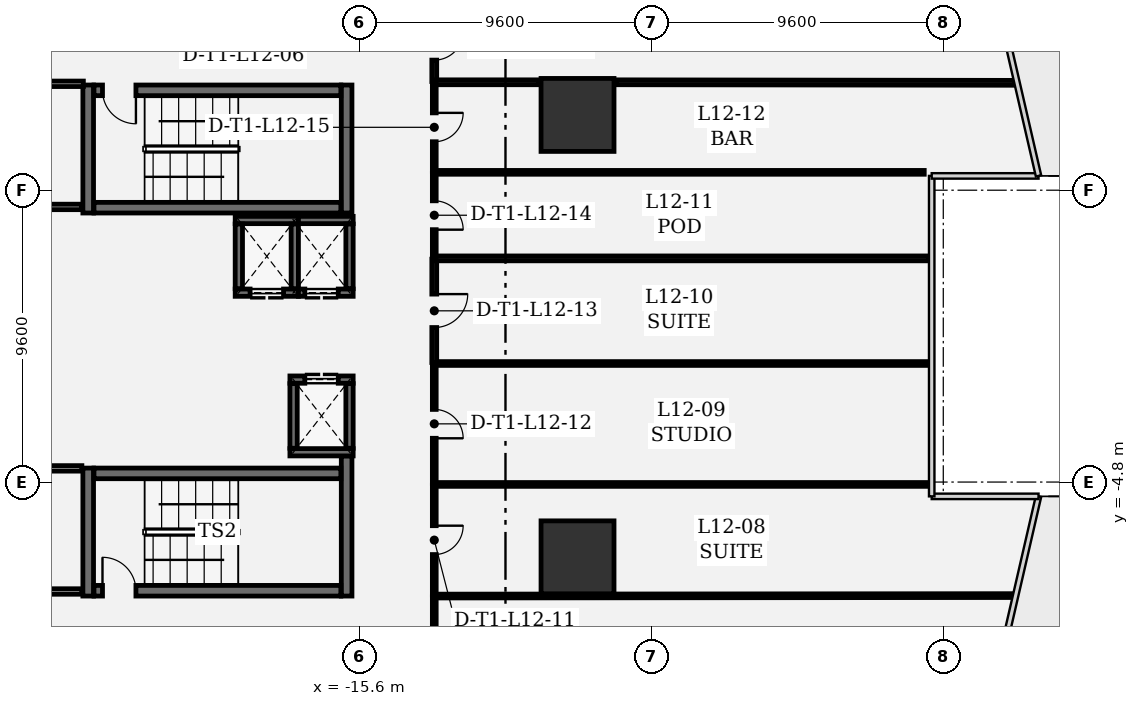
"""IFC4 building model, lengths in metres.
Left out: names, types, materials, properties, quantities, classifications, styles, units other than length and angle.
Written with IfcOpenShell. Run it as: python <this file> out.ifc"""

import sys

from ifc_helpers import new_model, si_unit, direction, frame, frame_2d, origin, origin_2d, place, context, subcontext, project, spatial, rectangle, extrude, element, fill, save


model = new_model("IFC4")
c1 = context("Model", 3, precision=1e-05, world=origin(), true_north=direction((0.0, 1.0)))
c2 = subcontext(c1, "Body", "Model", "MODEL_VIEW")
j1 = project(units=[si_unit("LENGTHUNIT", "METRE"), si_unit("PLANEANGLEUNIT", "RADIAN")], contexts=[c1])
p1 = place(None, origin())
s1 = spatial("IfcSite", under=j1, at=p1, CompositionType="ELEMENT")
p2 = place(p1, origin())
s2 = spatial("IfcBuilding", under=s1, at=p2, CompositionType="ELEMENT")
p3 = place(p2, frame((0.0, 0.0, 57.6)))
s3 = spatial("IfcBuildingStorey", under=s2, at=p3, CompositionType="ELEMENT", Elevation=57.6)
for number, where, z_axis, x_axis in (
    (1, (-8.43, -7.276, 0.0), (0.0, 0.0, 1.0), (1.0, 0.0, 0.0)),
    (2, (-8.43, 7.276, 0.0), (0.0, 0.0, 1.0), (1.0, 0.0, 0.0)),
):
    element("IfcColumn", number, at=place(p3, frame(where, z_axis=z_axis, x_axis=x_axis)), inside=s3, PredefinedType="COLUMN", context=c2, shape_type="SweptSolid", body=[
        extrude(rectangle(XDim=2.4, YDim=2.4, at=origin_2d()), origin(), (0.0, 0.0, 1.0), 4.2),
    ])
for number, where, z_axis, x_axis in (
    (3, (-24.525, 8.26, 0.0), (0.0, 0.0, 1.0), (0.0, -1.0, 0.0)),
    (4, (-16.025, 4.05, 0.0), (0.0, 0.0, 1.0), (0.0, 1.0, 0.0)),
):
    element("IfcWall", number, at=place(p3, frame(where, z_axis=z_axis, x_axis=x_axis)), inside=s3, PredefinedType="SHEAR", context=c2, shape_type="SweptSolid", body=[
        extrude(rectangle(XDim=4.21, YDim=0.35, at=frame_2d((2.105, 0.0))), origin(), (0.0, 0.0, 1.0), 3.92),
    ])
p4 = place(p3, frame((-24.335, 4.225, 0.0), z_axis=(0.0, 0.0, 1.0), x_axis=(1.0, 0.0, 0.0)))
e5 = element("IfcWall", 5, at=p4, inside=s3, PredefinedType="SHEAR", context=c2, shape_type="SweptSolid", body=[
    extrude(rectangle(XDim=8.12, YDim=0.35, at=frame_2d((4.06, 0.0))), origin(), (0.0, 0.0, 1.0), 3.92),
])
p5 = place(p3, frame((-16.215, 8.085, 0.0), z_axis=(0.0, 0.0, 1.0), x_axis=(-1.0, 0.0, 0.0)))
e6 = element("IfcWall", 6, at=p5, inside=s3, PredefinedType="SHEAR", context=c2, shape_type="SweptSolid", body=[
    extrude(rectangle(XDim=8.12, YDim=0.35, at=frame_2d((4.06, 0.0))), origin(), (0.0, 0.0, 1.0), 3.92),
])
p6 = place(p5, frame((6.74, 0.0, 0.0)))
e7 = element("IfcOpeningElement", 7, at=p6, cuts=e6, PredefinedType="OPENING", context=c2, shape_type="SweptSolid", body=[
    extrude(rectangle(XDim=1.1, YDim=2.2, at=frame_2d((0.55, 1.1))), frame((0.0, 0.185, 0.0), z_axis=(0.0, -1.0, 0.0), x_axis=(1.0, 0.0, 0.0)), (0.0, 0.0, 1.0), 0.37),
])
p7 = place(p3, frame((-24.525, -4.34, 0.0), z_axis=(0.0, 0.0, 1.0), x_axis=(0.0, -1.0, 0.0)))
e8 = element("IfcWall", 8, at=p7, inside=s3, PredefinedType="SHEAR", context=c2, shape_type="SweptSolid", body=[
    extrude(rectangle(XDim=4.21, YDim=0.35, at=frame_2d((2.105, 0.0))), origin(), (0.0, 0.0, 1.0), 3.92),
])
p8 = place(p3, frame((-16.025, -8.55, 0.0), z_axis=(0.0, 0.0, 1.0), x_axis=(0.0, 1.0, 0.0)))
e9 = element("IfcWall", 9, at=p8, inside=s3, PredefinedType="SHEAR", context=c2, shape_type="SweptSolid", body=[
    extrude(rectangle(XDim=4.61, YDim=0.35, at=frame_2d((2.305, 0.0))), origin(), (0.0, 0.0, 1.0), 3.92),
])
p9 = place(p3, frame((-24.335, -8.375, 0.0), z_axis=(0.0, 0.0, 1.0), x_axis=(1.0, 0.0, 0.0)))
e10 = element("IfcWall", 10, at=p9, inside=s3, PredefinedType="SHEAR", context=c2, shape_type="SweptSolid", body=[
    extrude(rectangle(XDim=8.12, YDim=0.35, at=frame_2d((4.06, 0.0))), origin(), (0.0, 0.0, 1.0), 3.92),
])
p10 = place(p9, frame((0.28, 0.0, 0.0)))
e11 = element("IfcOpeningElement", 11, at=p10, cuts=e10, PredefinedType="OPENING", context=c2, shape_type="SweptSolid", body=[
    extrude(rectangle(XDim=1.1, YDim=2.2, at=frame_2d((0.55, 1.1))), frame((0.0, 0.185, 0.0), z_axis=(0.0, -1.0, 0.0), x_axis=(1.0, 0.0, 0.0)), (0.0, 0.0, 1.0), 0.37),
])
p11 = place(p3, frame((-16.215, -4.515, 0.0), z_axis=(0.0, 0.0, 1.0), x_axis=(-1.0, 0.0, 0.0)))
e12 = element("IfcWall", 12, at=p11, inside=s3, PredefinedType="SHEAR", context=c2, shape_type="SweptSolid", body=[
    extrude(rectangle(XDim=8.12, YDim=0.35, at=frame_2d((4.06, 0.0))), origin(), (0.0, 0.0, 1.0), 3.92),
])
p12 = place(p3, frame((-17.61, 1.43, 0.0), z_axis=(0.0, 0.0, 1.0), x_axis=(-1.0, 0.0, 0.0)))
e13 = element("IfcWall", 13, at=p12, inside=s3, PredefinedType="SHEAR", context=c2, shape_type="SweptSolid", body=[
    extrude(rectangle(XDim=2.08, YDim=0.24, at=frame_2d((1.04, 0.0))), origin(), (0.0, 0.0, 1.0), 3.92),
])
p13 = place(p12, frame((0.49, 0.0, 0.0)))
e14 = element("IfcOpeningElement", 14, at=p13, cuts=e13, PredefinedType="OPENING", context=c2, shape_type="SweptSolid", body=[
    extrude(rectangle(XDim=1.1, YDim=2.2, at=frame_2d((0.55, 1.1))), frame((0.0, 0.13, 0.0), z_axis=(0.0, -1.0, 0.0), x_axis=(1.0, 0.0, 0.0)), (0.0, 0.0, 1.0), 0.26),
])
p14 = place(p3, frame((-19.69, 3.82, 0.0), z_axis=(0.0, 0.0, 1.0), x_axis=(1.0, 0.0, 0.0)))
e15 = element("IfcWall", 15, at=p14, inside=s3, PredefinedType="SHEAR", context=c2, shape_type="SweptSolid", body=[
    extrude(rectangle(XDim=2.08, YDim=0.24, at=frame_2d((1.04, 0.0))), origin(), (0.0, 0.0, 1.0), 3.92),
])
for number, where, z_axis, x_axis in (
    (16, (-19.57, 1.562, 0.0), (0.0, 0.0, 1.0), (0.0, 1.0, 0.0)),
    (17, (-17.73, 3.688, 0.0), (0.0, 0.0, 1.0), (0.0, -1.0, 0.0)),
):
    element("IfcWall", number, at=place(p3, frame(where, z_axis=z_axis, x_axis=x_axis)), inside=s3, PredefinedType="SHEAR", context=c2, shape_type="SweptSolid", body=[
        extrude(rectangle(XDim=2.126, YDim=0.24, at=frame_2d((1.063, 0.0))), origin(), (0.0, 0.0, 1.0), 3.92),
    ])
p15 = place(p3, frame((-15.81, 1.43, 0.0), z_axis=(0.0, 0.0, 1.0), x_axis=(-1.0, 0.0, 0.0)))
e18 = element("IfcWall", 18, at=p15, inside=s3, PredefinedType="SHEAR", context=c2, shape_type="SweptSolid", body=[
    extrude(rectangle(XDim=1.8, YDim=0.24, at=frame_2d((0.9, 0.0))), origin(), (0.0, 0.0, 1.0), 3.92),
])
p16 = place(p15, frame((0.49, 0.0, 0.0)))
e19 = element("IfcOpeningElement", 19, at=p16, cuts=e18, PredefinedType="OPENING", context=c2, shape_type="SweptSolid", body=[
    extrude(rectangle(XDim=1.1, YDim=2.2, at=frame_2d((0.55, 1.1))), frame((0.0, 0.13, 0.0), z_axis=(0.0, -1.0, 0.0), x_axis=(1.0, 0.0, 0.0)), (0.0, 0.0, 1.0), 0.26),
])
p17 = place(p3, frame((-17.61, 3.82, 0.0), z_axis=(0.0, 0.0, 1.0), x_axis=(1.0, 0.0, 0.0)))
e20 = element("IfcWall", 20, at=p17, inside=s3, PredefinedType="SHEAR", context=c2, shape_type="SweptSolid", body=[
    extrude(rectangle(XDim=1.8, YDim=0.24, at=frame_2d((0.9, 0.0))), origin(), (0.0, 0.0, 1.0), 3.92),
])
p18 = place(p3, frame((-15.93, 3.688, 0.0), z_axis=(0.0, 0.0, 1.0), x_axis=(0.0, -1.0, 0.0)))
e21 = element("IfcWall", 21, at=p18, inside=s3, PredefinedType="SHEAR", context=c2, shape_type="SweptSolid", body=[
    extrude(rectangle(XDim=2.126, YDim=0.24, at=frame_2d((1.063, 0.0))), origin(), (0.0, 0.0, 1.0), 3.92),
])
p19 = place(p3, frame((-15.81, -3.82, 0.0), z_axis=(0.0, 0.0, 1.0), x_axis=(-1.0, 0.0, 0.0)))
e22 = element("IfcWall", 22, at=p19, inside=s3, PredefinedType="SHEAR", context=c2, shape_type="SweptSolid", body=[
    extrude(rectangle(XDim=2.08, YDim=0.24, at=frame_2d((1.04, 0.0))), origin(), (0.0, 0.0, 1.0), 3.92),
])
p20 = place(p3, frame((-17.89, -1.43, 0.0), z_axis=(0.0, 0.0, 1.0), x_axis=(1.0, 0.0, 0.0)))
e23 = element("IfcWall", 23, at=p20, inside=s3, PredefinedType="SHEAR", context=c2, shape_type="SweptSolid", body=[
    extrude(rectangle(XDim=2.08, YDim=0.24, at=frame_2d((1.04, 0.0))), origin(), (0.0, 0.0, 1.0), 3.92),
])
p21 = place(p20, frame((0.49, 0.0, 0.0)))
e24 = element("IfcOpeningElement", 24, at=p21, cuts=e23, PredefinedType="OPENING", context=c2, shape_type="SweptSolid", body=[
    extrude(rectangle(XDim=1.1, YDim=2.2, at=frame_2d((0.55, 1.1))), frame((0.0, 0.13, 0.0), z_axis=(0.0, -1.0, 0.0), x_axis=(1.0, 0.0, 0.0)), (0.0, 0.0, 1.0), 0.26),
])
for number, where, z_axis, x_axis in (
    (25, (-17.77, -3.688, 0.0), (0.0, 0.0, 1.0), (0.0, 1.0, 0.0)),
    (26, (-15.93, -1.562, 0.0), (0.0, 0.0, 1.0), (0.0, -1.0, 0.0)),
):
    element("IfcWall", number, at=place(p3, frame(where, z_axis=z_axis, x_axis=x_axis)), inside=s3, PredefinedType="SHEAR", context=c2, shape_type="SweptSolid", body=[
        extrude(rectangle(XDim=2.126, YDim=0.24, at=frame_2d((1.063, 0.0))), origin(), (0.0, 0.0, 1.0), 3.92),
    ])
p22 = place(p3, frame((-28.355, 4.25, 0.0), z_axis=(0.0, 0.0, 1.0), x_axis=(1.0, 0.0, 0.0)))
e27 = element("IfcWall", 27, at=p22, inside=s3, PredefinedType="PARTITIONING", context=c2, shape_type="SweptSolid", body=[
    extrude(rectangle(XDim=3.622, YDim=0.18, at=frame_2d((1.811, 0.0))), origin(), (0.0, 0.0, 1.0), 3.92),
])
p23 = place(p3, frame((-24.684, 8.3, 0.0), z_axis=(0.0, 0.0, 1.0), x_axis=(-1.0, 0.0, 0.0)))
e28 = element("IfcWall", 28, at=p23, inside=s3, PredefinedType="PARTITIONING", context=c2, shape_type="SweptSolid", body=[
    extrude(rectangle(XDim=3.671, YDim=0.18, at=frame_2d((1.835, 0.0))), origin(), (0.0, 0.0, 1.0), 3.92),
])
p24 = place(p23, frame((1.335, 0.0, 0.0)))
e29 = element("IfcOpeningElement", 29, at=p24, cuts=e28, PredefinedType="OPENING", context=c2, shape_type="SweptSolid", body=[
    extrude(rectangle(XDim=1.0, YDim=2.15, at=frame_2d((0.5, 1.075))), frame((0.0, 0.1, 0.0), z_axis=(0.0, -1.0, 0.0), x_axis=(1.0, 0.0, 0.0)), (0.0, 0.0, 1.0), 0.2),
])
p25 = place(p3, frame((-28.355, -8.4, 0.0), z_axis=(0.0, 0.0, 1.0), x_axis=(1.0, 0.0, 0.0)))
e30 = element("IfcWall", 30, at=p25, inside=s3, PredefinedType="PARTITIONING", context=c2, shape_type="SweptSolid", body=[
    extrude(rectangle(XDim=3.622, YDim=0.18, at=frame_2d((1.811, 0.0))), origin(), (0.0, 0.0, 1.0), 3.92),
])
p26 = place(p25, frame((1.311, 0.0, 0.0)))
e31 = element("IfcOpeningElement", 31, at=p26, cuts=e30, PredefinedType="OPENING", context=c2, shape_type="SweptSolid", body=[
    extrude(rectangle(XDim=1.0, YDim=2.15, at=frame_2d((0.5, 1.075))), frame((0.0, 0.1, 0.0), z_axis=(0.0, -1.0, 0.0), x_axis=(1.0, 0.0, 0.0)), (0.0, 0.0, 1.0), 0.2),
])
p27 = place(p3, frame((-24.733, -4.35, 0.0), z_axis=(0.0, 0.0, 1.0), x_axis=(-1.0, 0.0, 0.0)))
e32 = element("IfcWall", 32, at=p27, inside=s3, PredefinedType="PARTITIONING", context=c2, shape_type="SweptSolid", body=[
    extrude(rectangle(XDim=3.622, YDim=0.18, at=frame_2d((1.811, 0.0))), origin(), (0.0, 0.0, 1.0), 3.92),
])
p28 = place(p3, frame((-13.142, 10.733, 0.0), z_axis=(0.0, 0.0, 1.0), x_axis=(0.0, -1.0, 0.0)))
e33 = element("IfcWall", 33, at=p28, inside=s3, PredefinedType="PARTITIONING", context=c2, shape_type="SweptSolid", body=[
    extrude(rectangle(XDim=2.358, YDim=0.16, at=frame_2d((1.179, 0.0))), origin(), (0.0, 0.0, 1.0), 3.92),
])
p29 = place(p28, frame((0.704, 0.0, 0.0)))
e34 = element("IfcOpeningElement", 34, at=p29, cuts=e33, PredefinedType="OPENING", context=c2, shape_type="SweptSolid", body=[
    extrude(rectangle(XDim=0.95, YDim=2.15, at=frame_2d((0.475, 1.075))), frame((0.0, 0.09, 0.0), z_axis=(0.0, -1.0, 0.0), x_axis=(1.0, 0.0, 0.0)), (0.0, 0.0, 1.0), 0.18),
])
p30 = place(p3, frame((-13.117, 8.35, 0.0), z_axis=(0.0, 0.0, 1.0), x_axis=(1.0, 0.0, 0.0)))
e35 = element("IfcWall", 35, at=p30, inside=s3, PredefinedType="PARTITIONING", context=c2, shape_type="SweptSolid", body=[
    extrude(rectangle(XDim=3.422, YDim=0.16, at=frame_2d((1.711, 0.0))), origin(), (0.0, 0.0, 1.0), 2.957),
])
p31 = place(p3, frame((-7.165, 8.35, 0.0), z_axis=(0.0, 0.0, 1.0), x_axis=(0.999999076287, -0.001359200353, 0.0)))
e36 = element("IfcWall", 36, at=p31, inside=s3, PredefinedType="PARTITIONING", context=c2, shape_type="SweptSolid", body=[
    extrude(rectangle(XDim=13.112, YDim=0.16, at=frame_2d((6.556, 0.0))), origin(), (0.0, 0.0, 1.0), 3.92),
])
p32 = place(p3, frame((5.9, -8.534, 0.0), z_axis=(0.0, 0.0, 1.0), x_axis=(-0.99999966248, -0.000821608021, 0.0)))
e37 = element("IfcWall", 37, at=p32, inside=s3, PredefinedType="PARTITIONING", context=c2, shape_type="SweptSolid", body=[
    extrude(rectangle(XDim=19.018, YDim=0.125, at=frame_2d((9.509, 0.0))), origin(), (0.0, 0.0, 1.0), 2.957),
])
p33 = place(p3, frame((-13.142, -8.575, 0.0), z_axis=(0.0, 0.0, 1.0), x_axis=(0.0, -1.0, 0.0)))
e38 = element("IfcWall", 38, at=p33, inside=s3, PredefinedType="PARTITIONING", context=c2, shape_type="SweptSolid", body=[
    extrude(rectangle(XDim=2.358, YDim=0.125, at=frame_2d((1.179, 0.0))), origin(), (0.0, 0.0, 1.0), 3.92),
])
p34 = place(p3, frame((3.139, -4.878, 0.0), z_axis=(0.0, 0.0, 1.0), x_axis=(-1.0, 0.0, 0.0)))
e39 = element("IfcWall", 39, at=p34, inside=s3, PredefinedType="PARTITIONING", context=c2, shape_type="SweptSolid", body=[
    extrude(rectangle(XDim=16.257, YDim=0.125, at=frame_2d((8.128, 0.0))), origin(), (0.0, 0.0, 1.0), 3.92),
])
p35 = place(p3, frame((-13.142, -4.903, 0.0), z_axis=(0.0, 0.0, 1.0), x_axis=(0.0, -1.0, 0.0)))
e40 = element("IfcWall", 40, at=p35, inside=s3, PredefinedType="PARTITIONING", context=c2, shape_type="SweptSolid", body=[
    extrude(rectangle(XDim=3.614, YDim=0.125, at=frame_2d((1.807, 0.0))), origin(), (0.0, 0.0, 1.0), 3.92),
])
p36 = place(p35, frame((1.332, 0.0, 0.0)))
e41 = element("IfcOpeningElement", 41, at=p36, cuts=e40, PredefinedType="OPENING", context=c2, shape_type="SweptSolid", body=[
    extrude(rectangle(XDim=0.95, YDim=2.15, at=frame_2d((0.475, 1.075))), frame((0.0, 0.073, 0.0), z_axis=(0.0, -1.0, 0.0), x_axis=(1.0, 0.0, 0.0)), (0.0, 0.0, 1.0), 0.145),
])
p37 = place(p3, frame((-13.142, -0.925, 0.0), z_axis=(0.0, 0.0, 1.0), x_axis=(0.0, -1.0, 0.0)))
e42 = element("IfcWall", 42, at=p37, inside=s3, PredefinedType="PARTITIONING", context=c2, shape_type="SweptSolid", body=[
    extrude(rectangle(XDim=3.92, YDim=0.125, at=frame_2d((1.96, 0.0))), origin(), (0.0, 0.0, 1.0), 3.92),
])
p38 = place(p37, frame((1.485, 0.0, 0.0)))
e43 = element("IfcOpeningElement", 43, at=p38, cuts=e42, PredefinedType="OPENING", context=c2, shape_type="SweptSolid", body=[
    extrude(rectangle(XDim=0.95, YDim=2.15, at=frame_2d((0.475, 1.075))), frame((0.0, 0.073, 0.0), z_axis=(0.0, -1.0, 0.0), x_axis=(1.0, 0.0, 0.0)), (0.0, 0.0, 1.0), 0.145),
])
p39 = place(p3, frame((3.139, -0.9, 0.0), z_axis=(0.0, 0.0, 1.0), x_axis=(-1.0, 0.0, 0.0)))
e44 = element("IfcWall", 44, at=p39, inside=s3, PredefinedType="PARTITIONING", context=c2, shape_type="SweptSolid", body=[
    extrude(rectangle(XDim=16.257, YDim=0.125, at=frame_2d((8.128, 0.0))), origin(), (0.0, 0.0, 1.0), 3.92),
])
p40 = place(p3, frame((-13.142, 2.532, 0.0), z_axis=(0.0, 0.0, 1.0), x_axis=(0.0, -1.0, 0.0)))
e45 = element("IfcWall", 45, at=p40, inside=s3, PredefinedType="PARTITIONING", context=c2, shape_type="SweptSolid", body=[
    extrude(rectangle(XDim=3.4, YDim=0.16, at=frame_2d((1.7, 0.0))), origin(), (0.0, 0.0, 1.0), 3.92),
])
p41 = place(p40, frame((1.15, 0.0, 0.0)))
e46 = element("IfcOpeningElement", 46, at=p41, cuts=e45, PredefinedType="OPENING", context=c2, shape_type="SweptSolid", body=[
    extrude(rectangle(XDim=1.1, YDim=2.15, at=frame_2d((0.55, 1.075))), frame((0.0, 0.09, 0.0), z_axis=(0.0, -1.0, 0.0), x_axis=(1.0, 0.0, 0.0)), (0.0, 0.0, 1.0), 0.18),
])
p42 = place(p3, frame((3.139, 2.557, 0.0), z_axis=(0.0, 0.0, 1.0), x_axis=(-1.0, 0.0, 0.0)))
e47 = element("IfcWall", 47, at=p42, inside=s3, PredefinedType="PARTITIONING", context=c2, shape_type="SweptSolid", body=[
    extrude(rectangle(XDim=16.257, YDim=0.16, at=frame_2d((8.128, 0.0))), origin(), (0.0, 0.0, 1.0), 3.92),
])
p43 = place(p3, frame((-13.142, 5.363, 0.0), z_axis=(0.0, 0.0, 1.0), x_axis=(0.0, -1.0, 0.0)))
e48 = element("IfcWall", 48, at=p43, inside=s3, PredefinedType="PARTITIONING", context=c2, shape_type="SweptSolid", body=[
    extrude(rectangle(XDim=2.772, YDim=0.125, at=frame_2d((1.386, 0.0))), origin(), (0.0, 0.0, 1.0), 3.92),
])
p44 = place(p43, frame((0.911, 0.0, 0.0)))
e49 = element("IfcOpeningElement", 49, at=p44, cuts=e48, PredefinedType="OPENING", context=c2, shape_type="SweptSolid", body=[
    extrude(rectangle(XDim=0.95, YDim=2.15, at=frame_2d((0.475, 1.075))), frame((0.0, 0.073, 0.0), z_axis=(0.0, -1.0, 0.0), x_axis=(1.0, 0.0, 0.0)), (0.0, 0.0, 1.0), 0.145),
])
p45 = place(p3, frame((2.973, 5.388, 0.0), z_axis=(0.0, 0.0, 1.0), x_axis=(-1.0, 0.0, 0.0)))
e50 = element("IfcWall", 50, at=p45, inside=s3, PredefinedType="PARTITIONING", context=c2, shape_type="SweptSolid", body=[
    extrude(rectangle(XDim=16.091, YDim=0.125, at=frame_2d((8.045, 0.0))), origin(), (0.0, 0.0, 1.0), 3.92),
])
p46 = place(p3, frame((-13.142, 8.317, 0.0), z_axis=(0.0, 0.0, 1.0), x_axis=(0.0, -1.0, 0.0)))
e51 = element("IfcWall", 51, at=p46, inside=s3, PredefinedType="PARTITIONING", context=c2, shape_type="SweptSolid", body=[
    extrude(rectangle(XDim=2.896, YDim=0.125, at=frame_2d((1.448, 0.0))), origin(), (0.0, 0.0, 1.0), 3.92),
])
p47 = place(p46, frame((0.973, 0.0, 0.0)))
e52 = element("IfcOpeningElement", 52, at=p47, cuts=e51, PredefinedType="OPENING", context=c2, shape_type="SweptSolid", body=[
    extrude(rectangle(XDim=0.95, YDim=2.15, at=frame_2d((0.475, 1.075))), frame((0.0, 0.073, 0.0), z_axis=(0.0, -1.0, 0.0), x_axis=(1.0, 0.0, 0.0)), (0.0, 0.0, 1.0), 0.145),
])
p48 = place(p6, origin())
e53 = element("IfcDoor", 53, at=p48, inside=s3, OperationType="SINGLE_SWING_LEFT", PredefinedType="DOOR", context=c2, shape_type="SweptSolid", body=[
    extrude(rectangle(XDim=1.1, YDim=2.2, at=frame_2d((0.55, 1.1))), frame((0.0, 0.025, 0.0), z_axis=(0.0, -1.0, 0.0), x_axis=(1.0, 0.0, 0.0)), (0.0, 0.0, 1.0), 0.05),
])
fill(e7, e53)
p49 = place(p10, origin())
e54 = element("IfcDoor", 54, at=p49, inside=s3, OperationType="SINGLE_SWING_LEFT", PredefinedType="DOOR", context=c2, shape_type="SweptSolid", body=[
    extrude(rectangle(XDim=1.1, YDim=2.2, at=frame_2d((0.55, 1.1))), frame((0.0, 0.025, 0.0), z_axis=(0.0, -1.0, 0.0), x_axis=(1.0, 0.0, 0.0)), (0.0, 0.0, 1.0), 0.05),
])
fill(e11, e54)
p50 = place(p13, origin())
e55 = element("IfcDoor", 55, at=p50, inside=s3, OperationType="DOUBLE_DOOR_SLIDING", PredefinedType="DOOR", context=c2, shape_type="SweptSolid", body=[
    extrude(rectangle(XDim=1.1, YDim=2.2, at=frame_2d((0.55, 1.1))), frame((0.0, 0.025, 0.0), z_axis=(0.0, -1.0, 0.0), x_axis=(1.0, 0.0, 0.0)), (0.0, 0.0, 1.0), 0.05),
])
fill(e14, e55)
p51 = place(p16, origin())
e56 = element("IfcDoor", 56, at=p51, inside=s3, OperationType="DOUBLE_DOOR_SLIDING", PredefinedType="DOOR", context=c2, shape_type="SweptSolid", body=[
    extrude(rectangle(XDim=1.1, YDim=2.2, at=frame_2d((0.55, 1.1))), frame((0.0, 0.025, 0.0), z_axis=(0.0, -1.0, 0.0), x_axis=(1.0, 0.0, 0.0)), (0.0, 0.0, 1.0), 0.05),
])
fill(e19, e56)
p52 = place(p21, origin())
e57 = element("IfcDoor", 57, at=p52, inside=s3, OperationType="DOUBLE_DOOR_SLIDING", PredefinedType="DOOR", context=c2, shape_type="SweptSolid", body=[
    extrude(rectangle(XDim=1.1, YDim=2.2, at=frame_2d((0.55, 1.1))), frame((0.0, 0.025, 0.0), z_axis=(0.0, -1.0, 0.0), x_axis=(1.0, 0.0, 0.0)), (0.0, 0.0, 1.0), 0.05),
])
fill(e24, e57)
p53 = place(p29, origin())
e58 = element("IfcDoor", 58, at=p53, inside=s3, OperationType="SINGLE_SWING_LEFT", PredefinedType="DOOR", context=c2, shape_type="SweptSolid", body=[
    extrude(rectangle(XDim=0.95, YDim=2.15, at=frame_2d((0.475, 1.075))), frame((0.0, 0.025, 0.0), z_axis=(0.0, -1.0, 0.0), x_axis=(1.0, 0.0, 0.0)), (0.0, 0.0, 1.0), 0.05),
])
fill(e34, e58)
p54 = place(p36, origin())
e59 = element("IfcDoor", 59, at=p54, inside=s3, OperationType="SINGLE_SWING_LEFT", PredefinedType="DOOR", context=c2, shape_type="SweptSolid", body=[
    extrude(rectangle(XDim=0.95, YDim=2.15, at=frame_2d((0.475, 1.075))), frame((0.0, 0.025, 0.0), z_axis=(0.0, -1.0, 0.0), x_axis=(1.0, 0.0, 0.0)), (0.0, 0.0, 1.0), 0.05),
])
fill(e41, e59)
p55 = place(p38, origin())
e60 = element("IfcDoor", 60, at=p55, inside=s3, OperationType="SINGLE_SWING_RIGHT", PredefinedType="DOOR", context=c2, shape_type="SweptSolid", body=[
    extrude(rectangle(XDim=0.95, YDim=2.15, at=frame_2d((0.475, 1.075))), frame((0.0, 0.025, 0.0), z_axis=(0.0, -1.0, 0.0), x_axis=(1.0, 0.0, 0.0)), (0.0, 0.0, 1.0), 0.05),
])
fill(e43, e60)
p56 = place(p41, origin())
e61 = element("IfcDoor", 61, at=p56, inside=s3, OperationType="SINGLE_SWING_LEFT", PredefinedType="DOOR", context=c2, shape_type="SweptSolid", body=[
    extrude(rectangle(XDim=1.1, YDim=2.15, at=frame_2d((0.55, 1.075))), frame((0.0, 0.025, 0.0), z_axis=(0.0, -1.0, 0.0), x_axis=(1.0, 0.0, 0.0)), (0.0, 0.0, 1.0), 0.05),
])
fill(e46, e61)
p57 = place(p44, origin())
e62 = element("IfcDoor", 62, at=p57, inside=s3, OperationType="SINGLE_SWING_RIGHT", PredefinedType="DOOR", context=c2, shape_type="SweptSolid", body=[
    extrude(rectangle(XDim=0.95, YDim=2.15, at=frame_2d((0.475, 1.075))), frame((0.0, 0.025, 0.0), z_axis=(0.0, -1.0, 0.0), x_axis=(1.0, 0.0, 0.0)), (0.0, 0.0, 1.0), 0.05),
])
fill(e49, e62)
p58 = place(p47, origin())
e63 = element("IfcDoor", 63, at=p58, inside=s3, OperationType="SINGLE_SWING_LEFT", PredefinedType="DOOR", context=c2, shape_type="SweptSolid", body=[
    extrude(rectangle(XDim=0.95, YDim=2.15, at=frame_2d((0.475, 1.075))), frame((0.0, 0.025, 0.0), z_axis=(0.0, -1.0, 0.0), x_axis=(1.0, 0.0, 0.0)), (0.0, 0.0, 1.0), 0.05),
])
fill(e52, e63)
save(model, sys.argv[1])
